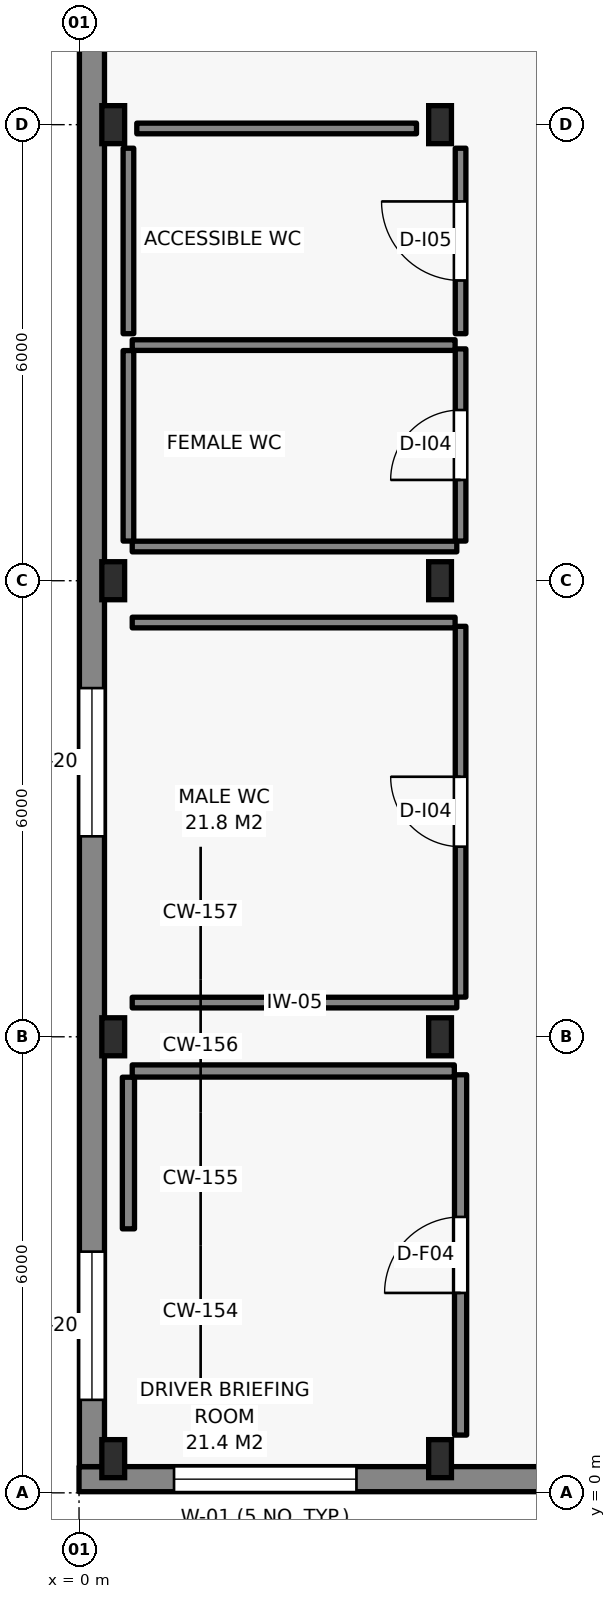
"""IFC4 building model, lengths in metres.
Left out: names, types, materials, properties, quantities, classifications, styles, units other than length and angle.
Written with IfcOpenShell. Run it as: python <this file> out.ifc"""

import sys

from ifc_helpers import new_model, si_unit, direction, frame, frame_2d, origin, origin_2d, place, context, subcontext, project, spatial, rectangle, i_section, extrude, element, fill, save


model = new_model("IFC4")
c1 = context("Model", 3, precision=1e-05, world=origin(), true_north=direction((0.0, 1.0)))
c2 = subcontext(c1, "Body", "Model", "MODEL_VIEW")
j1 = project(units=[si_unit("LENGTHUNIT", "METRE"), si_unit("PLANEANGLEUNIT", "RADIAN")], contexts=[c1])
p1 = place(None, origin())
s1 = spatial("IfcSite", under=j1, at=p1, CompositionType="ELEMENT")
p2 = place(p1, origin())
s2 = spatial("IfcBuilding", under=s1, at=p2, CompositionType="ELEMENT")
p3 = place(p2, frame((0.0, 0.0, 6.0)))
s3 = spatial("IfcBuildingStorey", under=s2, at=p3, CompositionType="ELEMENT", Elevation=6.0)
for number, where, z_axis, x_axis in (
    (1, (0.45, 0.45, 0.0), (0.0, 0.0, 1.0), (1.0, 0.0, 0.0)),
    (2, (0.45, 6.0, 0.0), (0.0, 0.0, 1.0), (1.0, 0.0, 0.0)),
    (3, (0.45, 12.0, 0.0), (0.0, 0.0, 1.0), (1.0, 0.0, 0.0)),
    (4, (0.45, 18.0, 0.0), (0.0, 0.0, 1.0), (1.0, 0.0, 0.0)),
    (5, (4.75, 0.45, 0.0), (0.0, 0.0, 1.0), (1.0, 0.0, 0.0)),
    (6, (4.75, 6.0, 0.0), (0.0, 0.0, 1.0), (1.0, 0.0, 0.0)),
    (7, (4.75, 12.0, 0.0), (0.0, 0.0, 1.0), (1.0, 0.0, 0.0)),
    (8, (4.75, 18.0, 0.0), (0.0, 0.0, 1.0), (1.0, 0.0, 0.0)),
):
    element("IfcColumn", number, at=place(p3, frame(where, z_axis=z_axis, x_axis=x_axis)), inside=s3, PredefinedType="COLUMN", context=c2, shape_type="SweptSolid", body=[
        extrude(i_section(OverallWidth=0.3, OverallDepth=0.5, WebThickness=0.014, FlangeThickness=0.028, FilletRadius=0.027, at=origin_2d()), origin(), (0.0, 0.0, 1.0), 4.5),
    ])
p4 = place(p3, frame((0.0, 0.18, 0.0), z_axis=(0.0, 0.0, 1.0), x_axis=(1.0, 0.0, 0.0)))
e9 = element("IfcWall", 9, at=p4, inside=s3, PredefinedType="SOLIDWALL", context=c2, shape_type="SweptSolid", body=[
    extrude(rectangle(XDim=19.6, YDim=0.33, at=frame_2d((9.8, 0.0))), origin(), (0.0, 0.0, 1.0), 3.985),
])
p5 = place(p4, frame((1.25, 0.0, 0.82)))
e10 = element("IfcOpeningElement", 10, at=p5, cuts=e9, PredefinedType="OPENING", context=c2, shape_type="SweptSolid", body=[
    extrude(rectangle(XDim=2.4, YDim=2.55, at=frame_2d((1.2, 1.275))), frame((0.0, 0.175, 0.0), z_axis=(0.0, -1.0, 0.0), x_axis=(1.0, 0.0, 0.0)), (0.0, 0.0, 1.0), 0.35),
])
p6 = place(p4, frame((6.15, 0.0, 0.82)))
e11 = element("IfcOpeningElement", 11, at=p6, cuts=e9, PredefinedType="OPENING", context=c2, shape_type="SweptSolid", body=[
    extrude(rectangle(XDim=2.4, YDim=2.55, at=frame_2d((1.2, 1.275))), frame((0.0, 0.175, 0.0), z_axis=(0.0, -1.0, 0.0), x_axis=(1.0, 0.0, 0.0)), (0.0, 0.0, 1.0), 0.35),
])
p7 = place(p4, frame((11.05, 0.0, 0.82)))
e12 = element("IfcOpeningElement", 12, at=p7, cuts=e9, PredefinedType="OPENING", context=c2, shape_type="SweptSolid", body=[
    extrude(rectangle(XDim=2.4, YDim=2.55, at=frame_2d((1.2, 1.275))), frame((0.0, 0.175, 0.0), z_axis=(0.0, -1.0, 0.0), x_axis=(1.0, 0.0, 0.0)), (0.0, 0.0, 1.0), 0.35),
])
p8 = place(p4, frame((15.95, 0.0, 0.82)))
e13 = element("IfcOpeningElement", 13, at=p8, cuts=e9, PredefinedType="OPENING", context=c2, shape_type="SweptSolid", body=[
    extrude(rectangle(XDim=2.4, YDim=2.55, at=frame_2d((1.2, 1.275))), frame((0.0, 0.175, 0.0), z_axis=(0.0, -1.0, 0.0), x_axis=(1.0, 0.0, 0.0)), (0.0, 0.0, 1.0), 0.35),
])
p9 = place(p3, frame((0.17, 30.0, 0.0), z_axis=(0.0, 0.0, 1.0), x_axis=(0.0, -1.0, 0.0)))
e14 = element("IfcWall", 14, at=p9, inside=s3, PredefinedType="SOLIDWALL", context=c2, shape_type="SweptSolid", body=[
    extrude(rectangle(XDim=29.655, YDim=0.33, at=frame_2d((14.828, 0.0))), origin(), (0.0, 0.0, 1.0), 3.885),
])
p10 = place(p9, frame((0.878, 0.0, 0.82)))
e15 = element("IfcOpeningElement", 15, at=p10, cuts=e14, PredefinedType="OPENING", context=c2, shape_type="SweptSolid", body=[
    extrude(rectangle(XDim=1.95, YDim=2.25, at=frame_2d((0.975, 1.125))), frame((0.0, 0.175, 0.0), z_axis=(0.0, -1.0, 0.0), x_axis=(1.0, 0.0, 0.0)), (0.0, 0.0, 1.0), 0.35),
])
p11 = place(p9, frame((8.292, 0.0, 0.82)))
e16 = element("IfcOpeningElement", 16, at=p11, cuts=e14, PredefinedType="OPENING", context=c2, shape_type="SweptSolid", body=[
    extrude(rectangle(XDim=1.95, YDim=2.25, at=frame_2d((0.975, 1.125))), frame((0.0, 0.175, 0.0), z_axis=(0.0, -1.0, 0.0), x_axis=(1.0, 0.0, 0.0)), (0.0, 0.0, 1.0), 0.35),
])
p12 = place(p9, frame((19.413, 0.0, 0.82)))
e17 = element("IfcOpeningElement", 17, at=p12, cuts=e14, PredefinedType="OPENING", context=c2, shape_type="SweptSolid", body=[
    extrude(rectangle(XDim=1.95, YDim=2.25, at=frame_2d((0.975, 1.125))), frame((0.0, 0.175, 0.0), z_axis=(0.0, -1.0, 0.0), x_axis=(1.0, 0.0, 0.0)), (0.0, 0.0, 1.0), 0.35),
])
p13 = place(p9, frame((26.827, 0.0, 0.82)))
e18 = element("IfcOpeningElement", 18, at=p13, cuts=e14, PredefinedType="OPENING", context=c2, shape_type="SweptSolid", body=[
    extrude(rectangle(XDim=1.95, YDim=2.25, at=frame_2d((0.975, 1.125))), frame((0.0, 0.175, 0.0), z_axis=(0.0, -1.0, 0.0), x_axis=(1.0, 0.0, 0.0)), (0.0, 0.0, 1.0), 0.35),
])
p14 = place(p3, frame((5.02, 0.76, 0.0), z_axis=(0.0, 0.0, 1.0), x_axis=(0.0, 1.0, 0.0)))
e19 = element("IfcWall", 19, at=p14, inside=s3, PredefinedType="PARTITIONING", context=c2, shape_type="SweptSolid", body=[
    extrude(rectangle(XDim=4.74, YDim=0.16, at=frame_2d((2.37, 0.0))), origin(), (0.0, 0.0, 1.0), 3.845),
])
p15 = place(p14, frame((1.87, 0.0, 0.0)))
e20 = element("IfcOpeningElement", 20, at=p15, cuts=e19, PredefinedType="OPENING", context=c2, shape_type="SweptSolid", body=[
    extrude(rectangle(XDim=1.0, YDim=2.15, at=frame_2d((0.5, 1.075))), frame((0.0, 0.09, 0.0), z_axis=(0.0, -1.0, 0.0), x_axis=(1.0, 0.0, 0.0)), (0.0, 0.0, 1.0), 0.18),
])
p16 = place(p3, frame((4.938, 5.55, 0.0), z_axis=(0.0, 0.0, 1.0), x_axis=(-1.0, 0.0, 0.0)))
e21 = element("IfcWall", 21, at=p16, inside=s3, PredefinedType="PARTITIONING", context=c2, shape_type="SweptSolid", body=[
    extrude(rectangle(XDim=4.238, YDim=0.16, at=frame_2d((2.119, 0.0))), origin(), (0.0, 0.0, 1.0), 3.845),
])
p17 = place(p3, frame((0.65, 5.468, 0.0), z_axis=(0.0, 0.0, 1.0), x_axis=(0.0, -1.0, 0.0)))
e22 = element("IfcWall", 22, at=p17, inside=s3, PredefinedType="PARTITIONING", context=c2, shape_type="SweptSolid", body=[
    extrude(rectangle(XDim=1.995, YDim=0.16, at=frame_2d((0.997, 0.0))), origin(), (0.0, 0.0, 1.0), 3.885),
])
p18 = place(p3, frame((0.7, 6.45, 0.0), z_axis=(0.0, 0.0, 1.0), x_axis=(1.0, 0.0, 0.0)))
e23 = element("IfcWall", 23, at=p18, inside=s3, PredefinedType="PARTITIONING", context=c2, shape_type="SweptSolid", body=[
    extrude(rectangle(XDim=4.27, YDim=0.14, at=frame_2d((2.135, 0.0))), origin(), (0.0, 0.0, 1.0), 3.845),
])
p19 = place(p3, frame((5.02, 6.522, 0.0), z_axis=(0.0, 0.0, 1.0), x_axis=(0.0, 1.0, 0.0)))
e24 = element("IfcWall", 24, at=p19, inside=s3, PredefinedType="PARTITIONING", context=c2, shape_type="SweptSolid", body=[
    extrude(rectangle(XDim=4.878, YDim=0.14, at=frame_2d((2.439, 0.0))), origin(), (0.0, 0.0, 1.0), 3.845),
])
p20 = place(p19, frame((1.979, 0.0, 0.0)))
e25 = element("IfcOpeningElement", 25, at=p20, cuts=e24, PredefinedType="OPENING", context=c2, shape_type="SweptSolid", body=[
    extrude(rectangle(XDim=0.92, YDim=2.08, at=frame_2d((0.46, 1.04))), frame((0.0, 0.08, 0.0), z_axis=(0.0, -1.0, 0.0), x_axis=(1.0, 0.0, 0.0)), (0.0, 0.0, 1.0), 0.16),
])
p21 = place(p3, frame((4.948, 11.45, 0.0), z_axis=(0.0, 0.0, 1.0), x_axis=(-1.0, 0.0, 0.0)))
e26 = element("IfcWall", 26, at=p21, inside=s3, PredefinedType="PARTITIONING", context=c2, shape_type="SweptSolid", body=[
    extrude(rectangle(XDim=4.248, YDim=0.14, at=frame_2d((2.124, 0.0))), origin(), (0.0, 0.0, 1.0), 3.845),
])
p22 = place(p3, frame((0.7, 12.45, 0.0), z_axis=(0.0, 0.0, 1.0), x_axis=(1.0, 0.0, 0.0)))
e27 = element("IfcWall", 27, at=p22, inside=s3, PredefinedType="PARTITIONING", context=c2, shape_type="SweptSolid", body=[
    extrude(rectangle(XDim=4.27, YDim=0.14, at=frame_2d((2.135, 0.0))), origin(), (0.0, 0.0, 1.0), 3.845),
])
p23 = place(p3, frame((5.02, 12.522, 0.0), z_axis=(0.0, 0.0, 1.0), x_axis=(0.0, 1.0, 0.0)))
e28 = element("IfcWall", 28, at=p23, inside=s3, PredefinedType="PARTITIONING", context=c2, shape_type="SweptSolid", body=[
    extrude(rectangle(XDim=2.528, YDim=0.14, at=frame_2d((1.264, 0.0))), origin(), (0.0, 0.0, 1.0), 3.845),
])
p24 = place(p23, frame((0.804, 0.0, 0.0)))
e29 = element("IfcOpeningElement", 29, at=p24, cuts=e28, PredefinedType="OPENING", context=c2, shape_type="SweptSolid", body=[
    extrude(rectangle(XDim=0.92, YDim=2.08, at=frame_2d((0.46, 1.04))), frame((0.0, 0.08, 0.0), z_axis=(0.0, -1.0, 0.0), x_axis=(1.0, 0.0, 0.0)), (0.0, 0.0, 1.0), 0.16),
])
p25 = place(p3, frame((4.948, 15.1, 0.0), z_axis=(0.0, 0.0, 1.0), x_axis=(-1.0, 0.0, 0.0)))
e30 = element("IfcWall", 30, at=p25, inside=s3, PredefinedType="PARTITIONING", context=c2, shape_type="SweptSolid", body=[
    extrude(rectangle(XDim=4.248, YDim=0.14, at=frame_2d((2.124, 0.0))), origin(), (0.0, 0.0, 1.0), 3.845),
])
p26 = place(p3, frame((0.65, 15.028, 0.0), z_axis=(0.0, 0.0, 1.0), x_axis=(0.0, -1.0, 0.0)))
e31 = element("IfcWall", 31, at=p26, inside=s3, PredefinedType="PARTITIONING", context=c2, shape_type="SweptSolid", body=[
    extrude(rectangle(XDim=2.506, YDim=0.14, at=frame_2d((1.253, 0.0))), origin(), (0.0, 0.0, 1.0), 3.885),
])
p27 = place(p3, frame((5.02, 15.25, 0.0), z_axis=(0.0, 0.0, 1.0), x_axis=(0.0, 1.0, 0.0)))
e32 = element("IfcWall", 32, at=p27, inside=s3, PredefinedType="PARTITIONING", context=c2, shape_type="SweptSolid", body=[
    extrude(rectangle(XDim=2.44, YDim=0.14, at=frame_2d((1.22, 0.0))), origin(), (0.0, 0.0, 1.0), 3.845),
])
p28 = place(p27, frame((0.7, 0.0, 0.0)))
e33 = element("IfcOpeningElement", 33, at=p28, cuts=e32, PredefinedType="OPENING", context=c2, shape_type="SweptSolid", body=[
    extrude(rectangle(XDim=1.04, YDim=2.1, at=frame_2d((0.52, 1.05))), frame((0.0, 0.08, 0.0), z_axis=(0.0, -1.0, 0.0), x_axis=(1.0, 0.0, 0.0)), (0.0, 0.0, 1.0), 0.16),
])
p29 = place(p3, frame((4.44, 17.95, 0.0), z_axis=(0.0, 0.0, 1.0), x_axis=(-1.0, 0.0, 0.0)))
e34 = element("IfcWall", 34, at=p29, inside=s3, PredefinedType="PARTITIONING", context=c2, shape_type="SweptSolid", body=[
    extrude(rectangle(XDim=3.68, YDim=0.14, at=frame_2d((1.84, 0.0))), origin(), (0.0, 0.0, 1.0), 3.845),
])
p30 = place(p3, frame((0.65, 17.69, 0.0), z_axis=(0.0, 0.0, 1.0), x_axis=(0.0, -1.0, 0.0)))
e35 = element("IfcWall", 35, at=p30, inside=s3, PredefinedType="PARTITIONING", context=c2, shape_type="SweptSolid", body=[
    extrude(rectangle(XDim=2.44, YDim=0.14, at=frame_2d((1.22, 0.0))), origin(), (0.0, 0.0, 1.0), 3.885),
])
p31 = place(p5, origin())
e36 = element("IfcWindow", 36, at=p31, inside=s3, PartitioningType="SINGLE_PANEL", PredefinedType="WINDOW", context=c2, shape_type="SweptSolid", body=[
    extrude(rectangle(XDim=2.4, YDim=2.55, at=frame_2d((1.2, 1.275))), frame((0.0, 0.03, 0.0), z_axis=(0.0, -1.0, 0.0), x_axis=(1.0, 0.0, 0.0)), (0.0, 0.0, 1.0), 0.06),
])
fill(e10, e36)
p32 = place(p12, origin())
e37 = element("IfcWindow", 37, at=p32, inside=s3, PartitioningType="SINGLE_PANEL", PredefinedType="WINDOW", context=c2, shape_type="SweptSolid", body=[
    extrude(rectangle(XDim=1.95, YDim=2.25, at=frame_2d((0.975, 1.125))), frame((0.0, 0.03, 0.0), z_axis=(0.0, -1.0, 0.0), x_axis=(1.0, 0.0, 0.0)), (0.0, 0.0, 1.0), 0.06),
])
fill(e17, e37)
p33 = place(p13, origin())
e38 = element("IfcWindow", 38, at=p33, inside=s3, PartitioningType="SINGLE_PANEL", PredefinedType="WINDOW", context=c2, shape_type="SweptSolid", body=[
    extrude(rectangle(XDim=1.95, YDim=2.25, at=frame_2d((0.975, 1.125))), frame((0.0, 0.03, 0.0), z_axis=(0.0, -1.0, 0.0), x_axis=(1.0, 0.0, 0.0)), (0.0, 0.0, 1.0), 0.06),
])
fill(e18, e38)
p34 = place(p15, origin())
e39 = element("IfcDoor", 39, at=p34, inside=s3, OperationType="SINGLE_SWING_LEFT", PredefinedType="DOOR", context=c2, shape_type="SweptSolid", body=[
    extrude(rectangle(XDim=1.0, YDim=2.15, at=frame_2d((0.5, 1.075))), frame((0.0, 0.025, 0.0), z_axis=(0.0, -1.0, 0.0), x_axis=(1.0, 0.0, 0.0)), (0.0, 0.0, 1.0), 0.05),
])
fill(e20, e39)
p35 = place(p20, origin())
e40 = element("IfcDoor", 40, at=p35, inside=s3, OperationType="SINGLE_SWING_RIGHT", PredefinedType="DOOR", context=c2, shape_type="SweptSolid", body=[
    extrude(rectangle(XDim=0.92, YDim=2.08, at=frame_2d((0.46, 1.04))), frame((0.0, 0.025, 0.0), z_axis=(0.0, -1.0, 0.0), x_axis=(1.0, 0.0, 0.0)), (0.0, 0.0, 1.0), 0.05),
])
fill(e25, e40)
p36 = place(p24, origin())
e41 = element("IfcDoor", 41, at=p36, inside=s3, OperationType="SINGLE_SWING_LEFT", PredefinedType="DOOR", context=c2, shape_type="SweptSolid", body=[
    extrude(rectangle(XDim=0.92, YDim=2.08, at=frame_2d((0.46, 1.04))), frame((0.0, 0.025, 0.0), z_axis=(0.0, -1.0, 0.0), x_axis=(1.0, 0.0, 0.0)), (0.0, 0.0, 1.0), 0.05),
])
fill(e29, e41)
p37 = place(p28, origin())
e42 = element("IfcDoor", 42, at=p37, inside=s3, OperationType="SINGLE_SWING_RIGHT", PredefinedType="DOOR", context=c2, shape_type="SweptSolid", body=[
    extrude(rectangle(XDim=1.04, YDim=2.1, at=frame_2d((0.52, 1.05))), frame((0.0, 0.025, 0.0), z_axis=(0.0, -1.0, 0.0), x_axis=(1.0, 0.0, 0.0)), (0.0, 0.0, 1.0), 0.05),
])
fill(e33, e42)
save(model, sys.argv[1])
